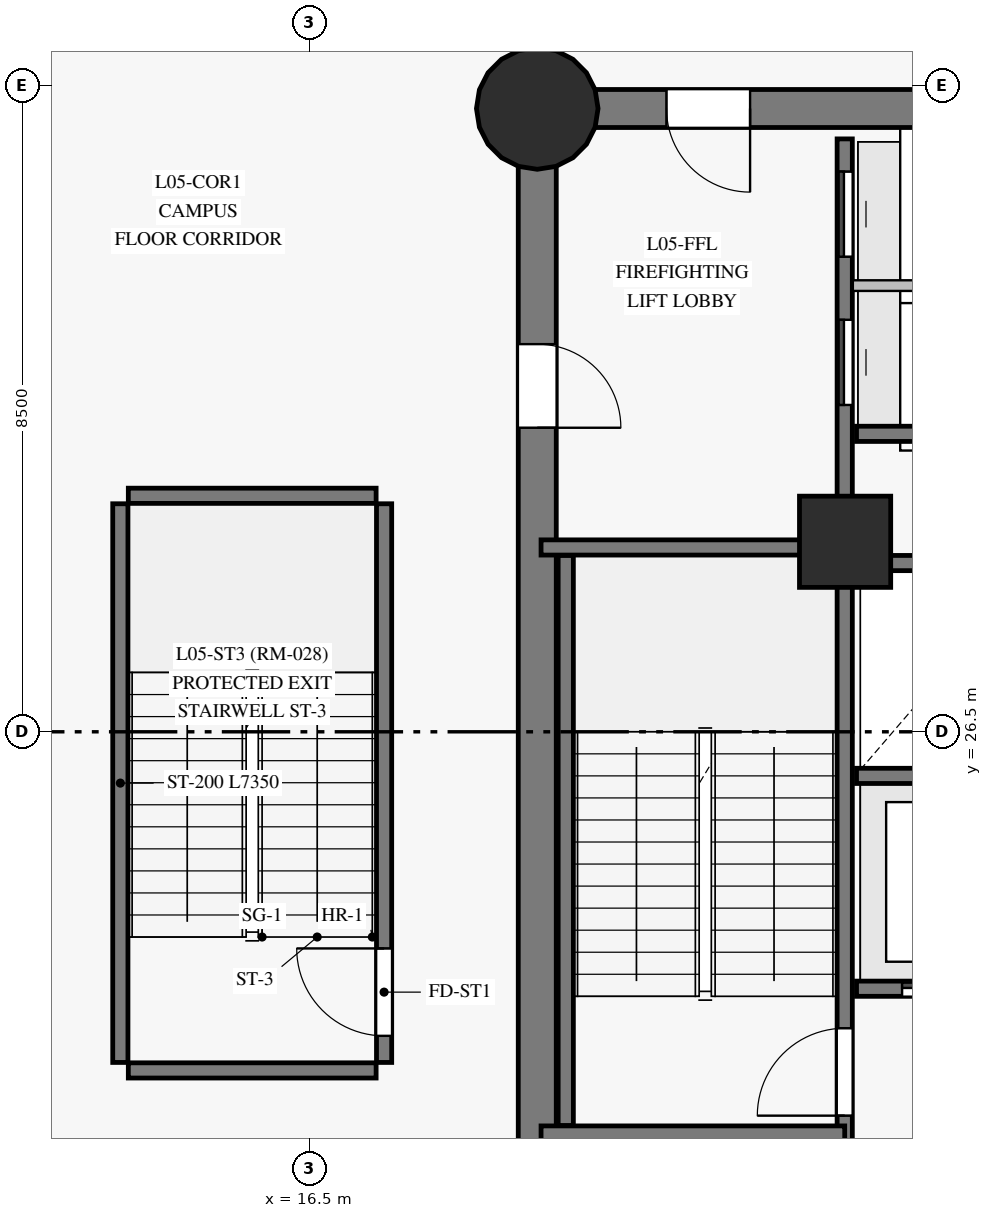
"""IFC4 building model, lengths in metres.
Left out: names, types, materials, properties, quantities, classifications, styles, units other than length and angle.
Written with IfcOpenShell. Run it as: python <this file> out.ifc"""

import sys

from ifc_helpers import new_model, si_unit, direction, frame, frame_2d, origin, origin_with_axes, origin_2d, place, context, subcontext, project, spatial, rectangle, circle, extrude, source, transform, mapped, element, fill, save


model = new_model("IFC4")
c1 = context("Model", 3, precision=1e-05, world=origin(), true_north=direction((0.0, 1.0)))
c2 = subcontext(c1, "Body", "Model", "MODEL_VIEW")
j1 = project(units=[si_unit("LENGTHUNIT", "METRE"), si_unit("PLANEANGLEUNIT", "RADIAN")], contexts=[c1])
p1 = place(None, origin())
s1 = spatial("IfcSite", under=j1, at=p1, CompositionType="ELEMENT")
p2 = place(p1, origin())
s2 = spatial("IfcBuilding", under=s1, at=p2, CompositionType="ELEMENT")
p3 = place(p2, frame((0.0, 0.0, 22.5)))
s3 = spatial("IfcBuildingStorey", under=s2, at=p3, CompositionType="ELEMENT", Elevation=22.5)
p4 = place(p3, frame((26.55, 34.7, 0.0), z_axis=(0.0, 0.0, 1.0), x_axis=(-1.0, 0.0, 0.0)))
e1 = element("IfcWall", 1, at=p4, inside=s3, PredefinedType="SHEAR", context=c2, shape_type="SweptSolid", body=[
    extrude(rectangle(XDim=7.05, YDim=0.5, at=frame_2d((3.525, 0.0))), origin(), (0.0, 0.0, 1.0), 3.75),
])
p5 = place(p4, frame((4.25, 0.0, 0.0)))
e2 = element("IfcOpeningElement", 2, at=p5, cuts=e1, PredefinedType="OPENING", context=c2, shape_type="SweptSolid", body=[
    extrude(rectangle(XDim=1.1, YDim=2.15, at=frame_2d((0.55, 1.075))), frame((0.0, 0.26, 0.0), z_axis=(0.0, -1.0, 0.0), x_axis=(1.0, 0.0, 0.0)), (0.0, 0.0, 1.0), 0.52),
])
p6 = place(p3, frame((19.5, 34.7, 0.0), z_axis=(0.0, 0.0, 1.0), x_axis=(0.0, -1.0, 0.0)))
e3 = element("IfcWall", 3, at=p6, inside=s3, PredefinedType="SHEAR", context=c2, shape_type="SweptSolid", body=[
    extrude(rectangle(XDim=16.4, YDim=0.5, at=frame_2d((8.2, 0.0))), origin(), (0.0, 0.0, 1.0), 3.75),
])
p7 = place(p6, frame((3.1, 0.0, 0.0)))
e4 = element("IfcOpeningElement", 4, at=p7, cuts=e3, PredefinedType="OPENING", context=c2, shape_type="SweptSolid", body=[
    extrude(rectangle(XDim=1.1, YDim=2.15, at=frame_2d((0.55, 1.075))), frame((0.0, 0.26, 0.0), z_axis=(0.0, -1.0, 0.0), x_axis=(1.0, 0.0, 0.0)), (0.0, 0.0, 1.0), 0.52),
])
m1 = source(origin_with_axes(), c2, "Body", "SweptSolid", [
    extrude(circle(Radius=0.8, at=origin_2d()), origin(), (0.0, 0.0, 1.0), 4.0),
])
p8 = place(p3, frame((19.5, 34.7, 0.0), z_axis=(0.0, 0.0, 1.0), x_axis=(1.0, 0.0, 0.0)))
e5 = element("IfcColumn", 5, at=p8, inside=s3, PredefinedType="COLUMN", context=c2, shape_type="MappedRepresentation", body=[
    mapped(m1, transform((0.0, 0.0, 0.0), scale=1.0)),
])
m2 = source(origin_with_axes(), c2, "Body", "SweptSolid", [
    extrude(rectangle(XDim=1.2, YDim=1.2, at=origin_2d()), origin(), (0.0, 0.0, 1.0), 4.0),
])
p9 = place(p3, frame((23.55, 29.0, 0.0), z_axis=(0.0, 0.0, 1.0), x_axis=(1.0, 0.0, 0.0)))
e6 = element("IfcColumn", 6, at=p9, inside=s3, PredefinedType="COLUMN", context=c2, shape_type="MappedRepresentation", body=[
    mapped(m2, transform((0.0, 0.0, 0.0), scale=1.0)),
])
p10 = place(p3, frame((23.545, 18.7, 0.0), z_axis=(0.0, 0.0, 1.0), x_axis=(0.0, 1.0, 0.0)))
e7 = element("IfcWall", 7, at=p10, inside=s3, PredefinedType="SHEAR", context=c2, shape_type="SweptSolid", body=[
    extrude(rectangle(XDim=15.6, YDim=0.2, at=frame_2d((7.8, 0.0))), origin(), (0.0, 0.0, 1.0), 3.75),
])
p11 = place(p10, frame((2.75, 0.0, 0.0)))
e8 = element("IfcOpeningElement", 8, at=p11, cuts=e7, PredefinedType="OPENING", context=c2, shape_type="SweptSolid", body=[
    extrude(rectangle(XDim=1.15, YDim=2.15, at=frame_2d((0.575, 1.075))), frame((0.0, 0.11, 0.0), z_axis=(0.0, -1.0, 0.0), x_axis=(1.0, 0.0, 0.0)), (0.0, 0.0, 1.0), 0.22),
])
p12 = place(p10, frame((0.14, 0.0, 0.0)))
e9 = element("IfcOpeningElement", 9, at=p12, cuts=e7, PredefinedType="OPENING", context=c2, shape_type="SweptSolid", body=[
    extrude(rectangle(XDim=0.88, YDim=2.1, at=frame_2d((0.44, 1.05))), frame((0.0, 0.11, 0.0), z_axis=(0.0, -1.0, 0.0), x_axis=(1.0, 0.0, 0.0)), (0.0, 0.0, 1.0), 0.22),
])
p13 = place(p10, frame((1.36, 0.0, 0.0)))
e10 = element("IfcOpeningElement", 10, at=p13, cuts=e7, PredefinedType="OPENING", context=c2, shape_type="SweptSolid", body=[
    extrude(rectangle(XDim=0.88, YDim=2.1, at=frame_2d((0.44, 1.05))), frame((0.0, 0.11, 0.0), z_axis=(0.0, -1.0, 0.0), x_axis=(1.0, 0.0, 0.0)), (0.0, 0.0, 1.0), 0.22),
])
p14 = place(p10, frame((12.1, 0.0, 0.0)))
e11 = element("IfcOpeningElement", 11, at=p14, cuts=e7, PredefinedType="OPENING", context=c2, shape_type="SweptSolid", body=[
    extrude(rectangle(XDim=1.12, YDim=2.15, at=frame_2d((0.56, 1.075))), frame((0.0, 0.11, 0.0), z_axis=(0.0, -1.0, 0.0), x_axis=(1.0, 0.0, 0.0)), (0.0, 0.0, 1.0), 0.22),
])
p15 = place(p10, frame((14.05, 0.0, 0.0)))
e12 = element("IfcOpeningElement", 12, at=p15, cuts=e7, PredefinedType="OPENING", context=c2, shape_type="SweptSolid", body=[
    extrude(rectangle(XDim=1.12, YDim=2.15, at=frame_2d((0.56, 1.075))), frame((0.0, 0.11, 0.0), z_axis=(0.0, -1.0, 0.0), x_axis=(1.0, 0.0, 0.0)), (0.0, 0.0, 1.0), 0.22),
])
p16 = place(p3, frame((23.7, 23.12, 0.0), z_axis=(0.0, 0.0, 1.0), x_axis=(1.0, 0.0, 0.0)))
e13 = element("IfcWall", 13, at=p16, inside=s3, PredefinedType="SHEAR", context=c2, shape_type="SweptSolid", body=[
    extrude(rectangle(XDim=9.6, YDim=0.2, at=frame_2d((4.8, 0.0))), origin(), (0.0, 0.0, 1.0), 3.75),
])
p17 = place(p16, frame((0.6, 0.0, 0.0)))
e14 = element("IfcOpeningElement", 14, at=p17, cuts=e13, PredefinedType="OPENING", context=c2, shape_type="SweptSolid", body=[
    extrude(rectangle(XDim=1.1, YDim=2.15, at=frame_2d((0.55, 1.075))), frame((0.0, 0.11, 0.0), z_axis=(0.0, -1.0, 0.0), x_axis=(1.0, 0.0, 0.0)), (0.0, 0.0, 1.0), 0.22),
])
p18 = place(p16, frame((2.98, 0.0, 0.0)))
e15 = element("IfcOpeningElement", 15, at=p18, cuts=e13, PredefinedType="OPENING", context=c2, shape_type="SweptSolid", body=[
    extrude(rectangle(XDim=1.1, YDim=2.15, at=frame_2d((0.55, 1.075))), frame((0.0, 0.11, 0.0), z_axis=(0.0, -1.0, 0.0), x_axis=(1.0, 0.0, 0.0)), (0.0, 0.0, 1.0), 0.22),
])
p19 = place(p16, frame((5.36, 0.0, 0.0)))
e16 = element("IfcOpeningElement", 16, at=p19, cuts=e13, PredefinedType="OPENING", context=c2, shape_type="SweptSolid", body=[
    extrude(rectangle(XDim=1.1, YDim=2.15, at=frame_2d((0.55, 1.075))), frame((0.0, 0.11, 0.0), z_axis=(0.0, -1.0, 0.0), x_axis=(1.0, 0.0, 0.0)), (0.0, 0.0, 1.0), 0.22),
])
p20 = place(p16, frame((7.74, 0.0, 0.0)))
e17 = element("IfcOpeningElement", 17, at=p20, cuts=e13, PredefinedType="OPENING", context=c2, shape_type="SweptSolid", body=[
    extrude(rectangle(XDim=1.1, YDim=2.15, at=frame_2d((0.55, 1.075))), frame((0.0, 0.11, 0.0), z_axis=(0.0, -1.0, 0.0), x_axis=(1.0, 0.0, 0.0)), (0.0, 0.0, 1.0), 0.22),
])
for number, where, z_axis, x_axis in (
    (18, (23.7, 25.92, 0.0), (0.0, 0.0, 1.0), (1.0, 0.0, 0.0)),
    (19, (23.7, 28.72, 0.0), (0.0, 0.0, 1.0), (1.0, 0.0, 0.0)),
):
    element("IfcWall", number, at=place(p3, frame(where, z_axis=z_axis, x_axis=x_axis)), inside=s3, PredefinedType="SHEAR", context=c2, shape_type="SweptSolid", body=[
        extrude(rectangle(XDim=9.6, YDim=0.2, at=frame_2d((4.8, 0.0))), origin(), (0.0, 0.0, 1.0), 3.75),
    ])
p21 = place(p3, frame((19.875, 21.32, 0.0), z_axis=(0.0, 0.0, 1.0), x_axis=(0.0, 1.0, 0.0)))
e20 = element("IfcWall", 20, at=p21, inside=s3, PredefinedType="SHEAR", context=c2, shape_type="SweptSolid", body=[
    extrude(rectangle(XDim=7.5, YDim=0.2, at=frame_2d((3.75, 0.0))), origin(), (0.0, 0.0, 1.0), 3.75),
])
p22 = place(p3, frame((14.015, 22.15, 0.0), z_axis=(0.0, 0.0, 1.0), x_axis=(0.0, 1.0, 0.0)))
e21 = element("IfcWall", 21, at=p22, inside=s3, PredefinedType="SHEAR", context=c2, shape_type="SweptSolid", body=[
    extrude(rectangle(XDim=7.35, YDim=0.2, at=frame_2d((3.675, 0.0))), origin(), (0.0, 0.0, 1.0), 3.75),
])
p23 = place(p3, frame((17.485, 22.15, 0.0), z_axis=(0.0, 0.0, 1.0), x_axis=(0.0, 1.0, 0.0)))
e22 = element("IfcWall", 22, at=p23, inside=s3, PredefinedType="SHEAR", context=c2, shape_type="SweptSolid", body=[
    extrude(rectangle(XDim=7.35, YDim=0.2, at=frame_2d((3.675, 0.0))), origin(), (0.0, 0.0, 1.0), 3.75),
])
p24 = place(p23, frame((0.35, 0.0, 0.0)))
e23 = element("IfcOpeningElement", 23, at=p24, cuts=e22, PredefinedType="OPENING", context=c2, shape_type="SweptSolid", body=[
    extrude(rectangle(XDim=1.15, YDim=2.15, at=frame_2d((0.575, 1.075))), frame((0.0, 0.11, 0.0), z_axis=(0.0, -1.0, 0.0), x_axis=(1.0, 0.0, 0.0)), (0.0, 0.0, 1.0), 0.22),
])
for number, where, z_axis, x_axis in (
    (24, (19.55, 21.215, 0.0), (0.0, 0.0, 1.0), (1.0, 0.0, 0.0)),
    (25, (19.55, 28.925, 0.0), (0.0, 0.0, 1.0), (1.0, 0.0, 0.0)),
):
    element("IfcWall", number, at=place(p3, frame(where, z_axis=z_axis, x_axis=x_axis)), inside=s3, PredefinedType="SHEAR", context=c2, shape_type="SweptSolid", body=[
        extrude(rectangle(XDim=3.995, YDim=0.2, at=frame_2d((1.998, 0.0))), origin(), (0.0, 0.0, 1.0), 3.75),
    ])
for number, where, z_axis, x_axis in (
    (26, (14.12, 22.045, 0.0), (0.0, 0.0, 1.0), (1.0, 0.0, 0.0)),
    (27, (14.12, 29.605, 0.0), (0.0, 0.0, 1.0), (1.0, 0.0, 0.0)),
):
    element("IfcWall", number, at=place(p3, frame(where, z_axis=z_axis, x_axis=x_axis)), inside=s3, PredefinedType="SHEAR", context=c2, shape_type="SweptSolid", body=[
        extrude(rectangle(XDim=3.26, YDim=0.2, at=frame_2d((1.63, 0.0))), origin(), (0.0, 0.0, 1.0), 3.75),
    ])
p25 = place(p3, frame((23.7, 30.42, 0.0), z_axis=(0.0, 0.0, 1.0), x_axis=(1.0, 0.0, 0.0)))
e28 = element("IfcWall", 28, at=p25, inside=s3, PredefinedType="SHEAR", context=c2, shape_type="SweptSolid", body=[
    extrude(rectangle(XDim=2.78, YDim=0.2, at=frame_2d((1.39, 0.0))), origin(), (0.0, 0.0, 1.0), 3.75),
])
p26 = place(p3, frame((23.652, 32.37, 0.0), z_axis=(0.0, 0.0, 1.0), x_axis=(1.0, 0.0, 0.0)))
e29 = element("IfcWall", 29, at=p26, inside=s3, PredefinedType="PARTITIONING", context=c2, shape_type="SweptSolid", body=[
    extrude(rectangle(XDim=2.828, YDim=0.14, at=frame_2d((1.414, 0.0))), origin(), (0.0, 0.0, 1.0), 3.75),
])
m3 = source(origin_with_axes(), c2, "Body", "SweptSolid", [
    extrude(rectangle(XDim=1.15, YDim=2.15, at=frame_2d((0.575, 1.075))), frame((0.0, 0.025, 0.0), z_axis=(0.0, -1.0, 0.0), x_axis=(1.0, 0.0, 0.0)), (0.0, 0.0, 1.0), 0.05),
])
p27 = place(p11, origin())
e30 = element("IfcDoor", 30, at=p27, inside=s3, OperationType="SINGLE_SWING_LEFT", PredefinedType="DOOR", context=c2, shape_type="MappedRepresentation", body=[
    mapped(m3, transform((0.0, 0.0, 0.0), scale=1.0)),
])
fill(e8, e30)
m4 = source(origin_with_axes(), c2, "Body", "SweptSolid", [
    extrude(rectangle(XDim=1.1, YDim=2.15, at=frame_2d((0.55, 1.075))), frame((0.0, 0.025, 0.0), z_axis=(0.0, -1.0, 0.0), x_axis=(1.0, 0.0, 0.0)), (0.0, 0.0, 1.0), 0.05),
])
p28 = place(p5, origin())
e31 = element("IfcDoor", 31, at=p28, inside=s3, OperationType="SINGLE_SWING_LEFT", PredefinedType="DOOR", context=c2, shape_type="MappedRepresentation", body=[
    mapped(m4, transform((0.0, 0.0, 0.0), scale=1.0)),
])
fill(e2, e31)
p29 = place(p7, origin())
e32 = element("IfcDoor", 32, at=p29, inside=s3, OperationType="SINGLE_SWING_RIGHT", PredefinedType="DOOR", context=c2, shape_type="MappedRepresentation", body=[
    mapped(m4, transform((0.0, 0.0, 0.0), scale=1.0)),
])
fill(e4, e32)
p30 = place(p17, origin())
e33 = element("IfcDoor", 33, at=p30, inside=s3, OperationType="SLIDING_TO_LEFT", PredefinedType="DOOR", context=c2, shape_type="MappedRepresentation", body=[
    mapped(m4, transform((0.0, 0.0, 0.0), scale=1.0)),
])
fill(e14, e33)
m5 = source(origin_with_axes(), c2, "Body", "SweptSolid", [
    extrude(rectangle(XDim=1.12, YDim=2.15, at=frame_2d((0.56, 1.075))), frame((0.0, 0.025, 0.0), z_axis=(0.0, -1.0, 0.0), x_axis=(1.0, 0.0, 0.0)), (0.0, 0.0, 1.0), 0.05),
])
p31 = place(p14, origin())
e34 = element("IfcDoor", 34, at=p31, inside=s3, OperationType="SLIDING_TO_LEFT", PredefinedType="DOOR", context=c2, shape_type="MappedRepresentation", body=[
    mapped(m5, transform((0.0, 0.0, 0.0), scale=1.0)),
])
fill(e11, e34)
p32 = place(p15, origin())
e35 = element("IfcDoor", 35, at=p32, inside=s3, OperationType="SLIDING_TO_RIGHT", PredefinedType="DOOR", context=c2, shape_type="MappedRepresentation", body=[
    mapped(m5, transform((0.0, 0.0, 0.0), scale=1.0)),
])
fill(e12, e35)
p33 = place(p24, origin())
e36 = element("IfcDoor", 36, at=p33, inside=s3, OperationType="SINGLE_SWING_RIGHT", PredefinedType="DOOR", context=c2, shape_type="MappedRepresentation", body=[
    mapped(m3, transform((0.0, 0.0, 0.0), scale=1.0)),
])
fill(e23, e36)
save(model, sys.argv[1])
